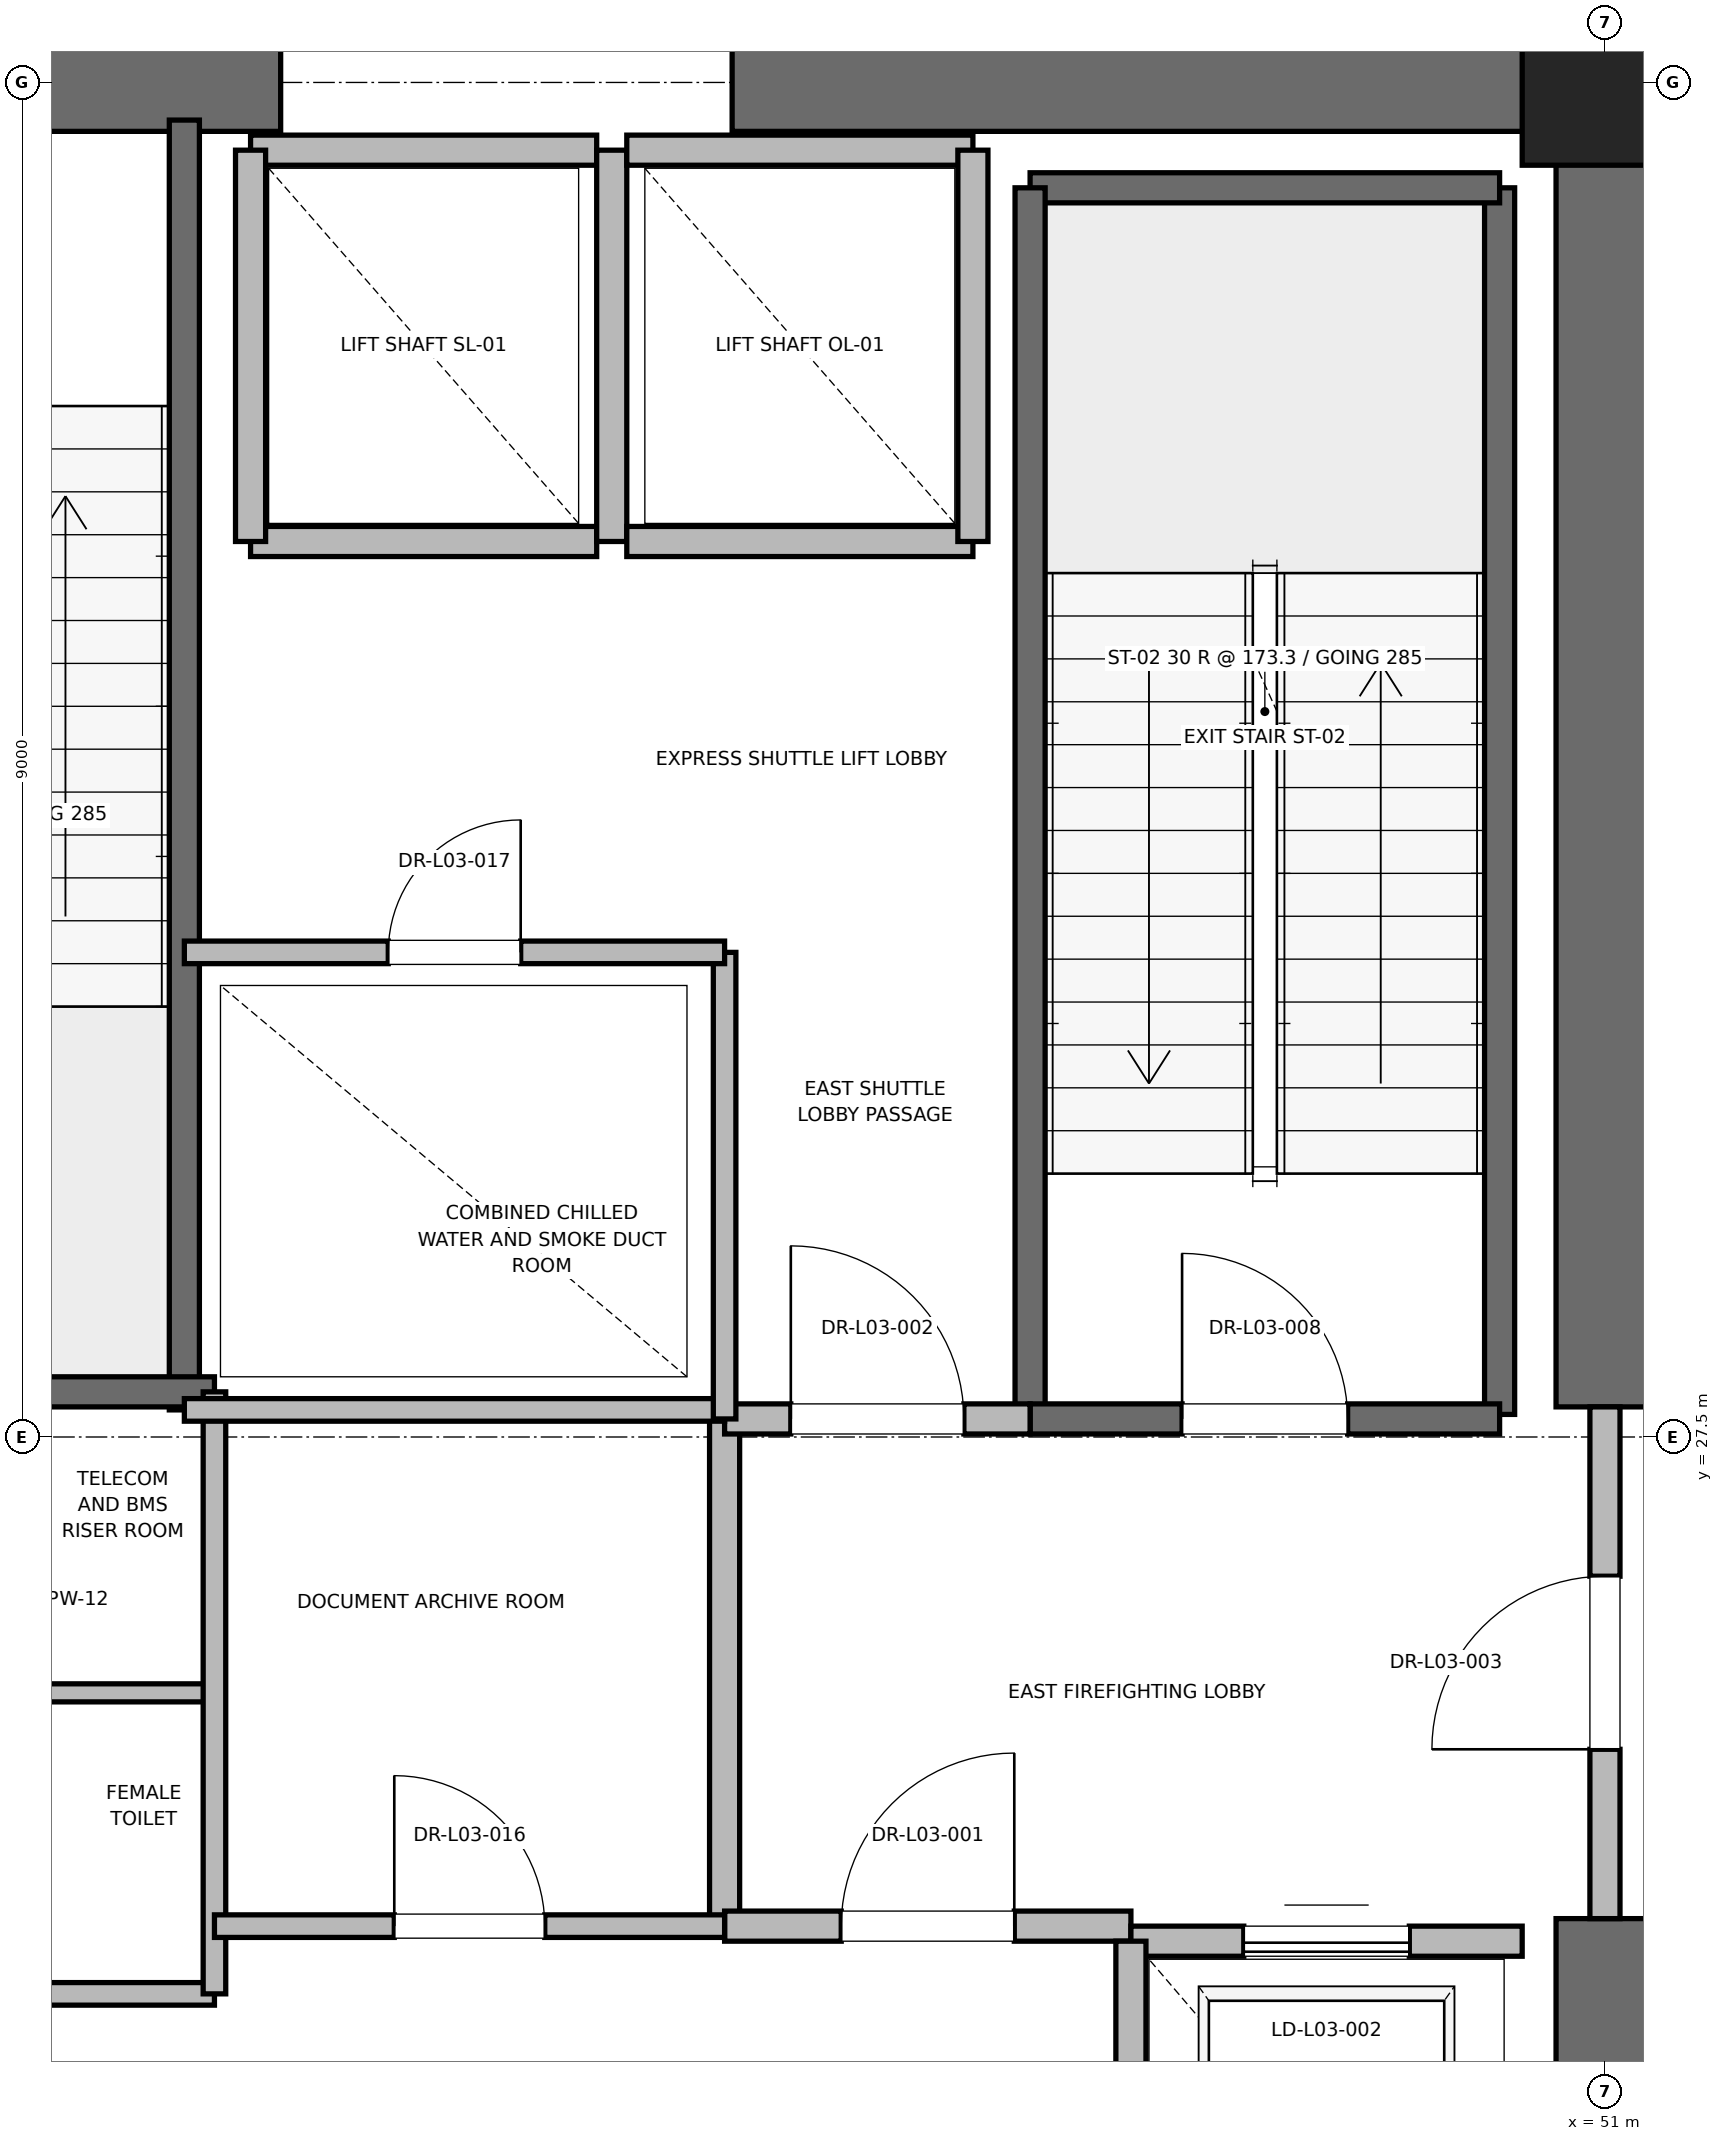
"""IFC4 building model, lengths in metres.
Left out: names, types, materials, properties, quantities, classifications, styles, units other than length and angle.
Written with IfcOpenShell. Run it as: python <this file> out.ifc"""

import sys

from ifc_helpers import new_model, si_unit, direction, frame, frame_2d, origin, origin_2d, place, context, subcontext, project, spatial, rectangle, extrude, element, fill, save


model = new_model("IFC4")
c1 = context("Model", 3, precision=1e-05, world=origin(), true_north=direction((0.0, 1.0)))
c2 = subcontext(c1, "Body", "Model", "MODEL_VIEW")
j1 = project(units=[si_unit("LENGTHUNIT", "METRE"), si_unit("PLANEANGLEUNIT", "RADIAN")], contexts=[c1])
p1 = place(None, origin())
s1 = spatial("IfcSite", under=j1, at=p1, CompositionType="ELEMENT")
p2 = place(p1, origin())
s2 = spatial("IfcBuilding", under=s1, at=p2, CompositionType="ELEMENT")
p3 = place(p2, frame((0.0, 0.0, 16.4)))
s3 = spatial("IfcBuildingStorey", under=s2, at=p3, CompositionType="ELEMENT", Elevation=16.4)
p4 = place(p3, frame((51.0, 36.5, 0.0), z_axis=(0.0, 0.0, 1.0), x_axis=(1.0, 0.0, 0.0)))
e1 = element("IfcColumn", 1, at=p4, inside=s3, PredefinedType="PILASTER", context=c2, shape_type="SweptSolid", body=[
    extrude(rectangle(XDim=1.1, YDim=1.1, at=origin_2d()), origin(), (0.0, 0.0, 1.0), 5.2),
])
p5 = place(p3, frame((37.8, 36.5, 0.0), z_axis=(0.0, 0.0, 1.0), x_axis=(1.0, 0.0, 0.0)))
e2 = element("IfcWall", 2, at=p5, inside=s3, PredefinedType="SHEAR", context=c2, shape_type="SweptSolid", body=[
    extrude(rectangle(XDim=4.4, YDim=0.65, at=frame_2d((2.2, 0.0))), origin(), (0.0, 0.0, 1.0), 4.9),
])
p6 = place(p5, frame((1.65, 0.0, 0.0)))
e3 = element("IfcOpeningElement", 3, at=p6, cuts=e2, PredefinedType="OPENING", context=c2, shape_type="SweptSolid", body=[
    extrude(rectangle(XDim=1.1, YDim=2.15, at=frame_2d((0.55, 1.075))), frame((0.0, 0.325, 0.0), z_axis=(0.0, -1.0, 0.0), x_axis=(1.0, 0.0, 0.0)), (0.0, 0.0, 1.0), 0.65),
])
for number, where, z_axis, x_axis in (
    (4, (45.2, 36.5, 0.0), (0.0, 0.0, 1.0), (1.0, 0.0, 0.0)),
    (5, (51.0, 18.5, 0.0), (0.0, 0.0, 1.0), (0.0, 1.0, 0.0)),
):
    element("IfcWall", number, at=place(p3, frame(where, z_axis=z_axis, x_axis=x_axis)), inside=s3, PredefinedType="SHEAR", context=c2, shape_type="SweptSolid", body=[
        extrude(rectangle(XDim=5.8, YDim=0.65, at=frame_2d((2.9, 0.0))), origin(), (0.0, 0.0, 1.0), 4.9),
    ])
p7 = place(p3, frame((51.0, 27.7, 0.0), z_axis=(0.0, 0.0, 1.0), x_axis=(0.0, 1.0, 0.0)))
e6 = element("IfcWall", 6, at=p7, inside=s3, PredefinedType="SHEAR", context=c2, shape_type="SweptSolid", body=[
    extrude(rectangle(XDim=8.8, YDim=0.65, at=frame_2d((4.4, 0.0))), origin(), (0.0, 0.0, 1.0), 4.9),
])
p8 = place(p3, frame((50.3, 27.65, 0.0), z_axis=(0.0, 0.0, 1.0), x_axis=(0.0, 1.0, 0.0)))
e7 = element("IfcWall", 7, at=p8, inside=s3, PredefinedType="SOLIDWALL", context=c2, shape_type="SweptSolid", body=[
    extrude(rectangle(XDim=8.15, YDim=0.2, at=frame_2d((4.075, 0.0))), origin(), (0.0, 0.0, 1.0), 4.9),
])
p9 = place(p3, frame((47.18, 35.8, 0.0), z_axis=(0.0, 0.0, 1.0), x_axis=(1.0, 0.0, 0.0)))
e8 = element("IfcWall", 8, at=p9, inside=s3, PredefinedType="SOLIDWALL", context=c2, shape_type="SweptSolid", body=[
    extrude(rectangle(XDim=3.12, YDim=0.2, at=frame_2d((1.56, 0.0))), origin(), (0.0, 0.0, 1.0), 4.9),
])
p10 = place(p3, frame((47.18, 27.62, 0.0), z_axis=(0.0, 0.0, 1.0), x_axis=(0.0, 1.0, 0.0)))
e9 = element("IfcWall", 9, at=p10, inside=s3, PredefinedType="SOLIDWALL", context=c2, shape_type="SweptSolid", body=[
    extrude(rectangle(XDim=8.18, YDim=0.2, at=frame_2d((4.09, 0.0))), origin(), (0.0, 0.0, 1.0), 4.9),
])
p11 = place(p3, frame((47.18, 27.62, 0.0), z_axis=(0.0, 0.0, 1.0), x_axis=(1.0, 0.0, 0.0)))
e10 = element("IfcWall", 10, at=p11, inside=s3, PredefinedType="SOLIDWALL", context=c2, shape_type="SweptSolid", body=[
    extrude(rectangle(XDim=3.12, YDim=0.2, at=frame_2d((1.56, 0.0))), origin(), (0.0, 0.0, 1.0), 4.9),
])
p12 = place(p11, frame((1.01, 0.0, 0.0)))
e11 = element("IfcOpeningElement", 11, at=p12, cuts=e10, PredefinedType="OPENING", context=c2, shape_type="SweptSolid", body=[
    extrude(rectangle(XDim=1.1, YDim=2.15, at=frame_2d((0.55, 1.075))), frame((0.0, 0.1, 0.0), z_axis=(0.0, -1.0, 0.0), x_axis=(1.0, 0.0, 0.0)), (0.0, 0.0, 1.0), 0.2),
])
p13 = place(p3, frame((41.56, 27.68, 0.0), z_axis=(0.0, 0.0, 1.0), x_axis=(0.0, 1.0, 0.0)))
e12 = element("IfcWall", 12, at=p13, inside=s3, PredefinedType="SOLIDWALL", context=c2, shape_type="SweptSolid", body=[
    extrude(rectangle(XDim=8.57, YDim=0.2, at=frame_2d((4.285, 0.0))), origin(), (0.0, 0.0, 1.0), 4.9),
])
p14 = place(p3, frame((38.44, 27.8, 0.0), z_axis=(0.0, 0.0, 1.0), x_axis=(1.0, 0.0, 0.0)))
e13 = element("IfcWall", 13, at=p14, inside=s3, PredefinedType="SOLIDWALL", context=c2, shape_type="SweptSolid", body=[
    extrude(rectangle(XDim=3.32, YDim=0.2, at=frame_2d((1.66, 0.0))), origin(), (0.0, 0.0, 1.0), 4.9),
])
p15 = place(p3, frame((45.15, 24.25, 0.0), z_axis=(0.0, 0.0, 1.0), x_axis=(0.0, 1.0, 0.0)))
e14 = element("IfcWall", 14, at=p15, inside=s3, PredefinedType="PARTITIONING", context=c2, shape_type="SweptSolid", body=[
    extrude(rectangle(XDim=3.37, YDim=0.2, at=frame_2d((1.685, 0.0))), origin(), (0.0, 0.0, 1.0), 4.9),
])
p16 = place(p3, frame((45.15, 24.25, 0.0), z_axis=(0.0, 0.0, 1.0), x_axis=(1.0, 0.0, 0.0)))
e15 = element("IfcWall", 15, at=p16, inside=s3, PredefinedType="PARTITIONING", context=c2, shape_type="SweptSolid", body=[
    extrude(rectangle(XDim=2.7, YDim=0.2, at=frame_2d((1.35, 0.0))), origin(), (0.0, 0.0, 1.0), 4.9),
])
p17 = place(p16, frame((0.775, 0.0, 0.0)))
e16 = element("IfcOpeningElement", 16, at=p17, cuts=e15, PredefinedType="OPENING", context=c2, shape_type="SweptSolid", body=[
    extrude(rectangle(XDim=1.15, YDim=2.2, at=frame_2d((0.575, 1.1))), frame((0.0, 0.1, 0.0), z_axis=(0.0, -1.0, 0.0), x_axis=(1.0, 0.0, 0.0)), (0.0, 0.0, 1.0), 0.2),
])
p18 = place(p3, frame((45.15, 27.62, 0.0), z_axis=(0.0, 0.0, 1.0), x_axis=(1.0, 0.0, 0.0)))
e17 = element("IfcWall", 17, at=p18, inside=s3, PredefinedType="PARTITIONING", context=c2, shape_type="SweptSolid", body=[
    extrude(rectangle(XDim=2.03, YDim=0.2, at=frame_2d((1.015, 0.0))), origin(), (0.0, 0.0, 1.0), 4.9),
])
p19 = place(p18, frame((0.44, 0.0, 0.0)))
e18 = element("IfcOpeningElement", 18, at=p19, cuts=e17, PredefinedType="OPENING", context=c2, shape_type="SweptSolid", body=[
    extrude(rectangle(XDim=1.15, YDim=2.2, at=frame_2d((0.575, 1.1))), frame((0.0, 0.1, 0.0), z_axis=(0.0, -1.0, 0.0), x_axis=(1.0, 0.0, 0.0)), (0.0, 0.0, 1.0), 0.2),
])
p20 = place(p3, frame((51.0, 24.3, 0.0), z_axis=(0.0, 0.0, 1.0), x_axis=(0.0, 1.0, 0.0)))
e19 = element("IfcWall", 19, at=p20, inside=s3, PredefinedType="PARTITIONING", context=c2, shape_type="SweptSolid", body=[
    extrude(rectangle(XDim=3.4, YDim=0.2, at=frame_2d((1.7, 0.0))), origin(), (0.0, 0.0, 1.0), 3.68),
])
p21 = place(p20, frame((1.125, 0.0, 0.0)))
e20 = element("IfcOpeningElement", 20, at=p21, cuts=e19, PredefinedType="OPENING", context=c2, shape_type="SweptSolid", body=[
    extrude(rectangle(XDim=1.15, YDim=2.2, at=frame_2d((0.575, 1.1))), frame((0.0, 0.1, 0.0), z_axis=(0.0, -1.0, 0.0), x_axis=(1.0, 0.0, 0.0)), (0.0, 0.0, 1.0), 0.2),
])
p22 = place(p3, frame((50.45, 24.15, 0.0), z_axis=(0.0, 0.0, 1.0), x_axis=(-1.0, 0.0, 0.0)))
e21 = element("IfcWall", 21, at=p22, inside=s3, PredefinedType="SOLIDWALL", context=c2, shape_type="SweptSolid", body=[
    extrude(rectangle(XDim=2.6, YDim=0.2, at=frame_2d((1.3, 0.0))), origin(), (0.0, 0.0, 1.0), 3.68),
])
p23 = place(p22, frame((0.75, 0.0, 0.0)))
e22 = element("IfcOpeningElement", 22, at=p23, cuts=e21, PredefinedType="OPENING", context=c2, shape_type="SweptSolid", body=[
    extrude(rectangle(XDim=1.1, YDim=2.2, at=frame_2d((0.55, 1.1))), frame((0.0, 0.1, 0.0), z_axis=(0.0, -1.0, 0.0), x_axis=(1.0, 0.0, 0.0)), (0.0, 0.0, 1.0), 0.2),
])
p24 = place(p3, frame((47.85, 24.15, 0.0), z_axis=(0.0, 0.0, 1.0), x_axis=(0.0, -1.0, 0.0)))
e23 = element("IfcWall", 23, at=p24, inside=s3, PredefinedType="SOLIDWALL", context=c2, shape_type="SweptSolid", body=[
    extrude(rectangle(XDim=3.0, YDim=0.2, at=frame_2d((1.5, 0.0))), origin(), (0.0, 0.0, 1.0), 4.9),
])
p25 = place(p3, frame((42.0, 33.45, 0.0), z_axis=(0.0, 0.0, 1.0), x_axis=(1.0, 0.0, 0.0)))
e24 = element("IfcWall", 24, at=p25, inside=s3, PredefinedType="SOLIDWALL", context=c2, shape_type="SweptSolid", body=[
    extrude(rectangle(XDim=2.3, YDim=0.2, at=frame_2d((1.15, 0.0))), origin(), (0.0, 0.0, 1.0), 4.9),
])
p26 = place(p3, frame((44.3, 36.05, 0.0), z_axis=(0.0, 0.0, 1.0), x_axis=(-1.0, 0.0, 0.0)))
e25 = element("IfcWall", 25, at=p26, inside=s3, PredefinedType="SOLIDWALL", context=c2, shape_type="SweptSolid", body=[
    extrude(rectangle(XDim=2.3, YDim=0.2, at=frame_2d((1.15, 0.0))), origin(), (0.0, 0.0, 1.0), 3.68),
])
for number, where, z_axis, x_axis in (
    (26, (42.0, 36.05, 0.0), (0.0, 0.0, 1.0), (0.0, -1.0, 0.0)),
    (27, (44.4, 33.45, 0.0), (0.0, 0.0, 1.0), (0.0, 1.0, 0.0)),
):
    element("IfcWall", number, at=place(p3, frame(where, z_axis=z_axis, x_axis=x_axis)), inside=s3, PredefinedType="SOLIDWALL", context=c2, shape_type="SweptSolid", body=[
        extrude(rectangle(XDim=2.6, YDim=0.2, at=frame_2d((1.3, 0.0))), origin(), (0.0, 0.0, 1.0), 3.68),
    ])
p27 = place(p3, frame((44.5, 33.45, 0.0), z_axis=(0.0, 0.0, 1.0), x_axis=(1.0, 0.0, 0.0)))
e28 = element("IfcWall", 28, at=p27, inside=s3, PredefinedType="SOLIDWALL", context=c2, shape_type="SweptSolid", body=[
    extrude(rectangle(XDim=2.3, YDim=0.2, at=frame_2d((1.15, 0.0))), origin(), (0.0, 0.0, 1.0), 4.9),
])
p28 = place(p3, frame((46.8, 36.05, 0.0), z_axis=(0.0, 0.0, 1.0), x_axis=(-1.0, 0.0, 0.0)))
e29 = element("IfcWall", 29, at=p28, inside=s3, PredefinedType="SOLIDWALL", context=c2, shape_type="SweptSolid", body=[
    extrude(rectangle(XDim=2.3, YDim=0.2, at=frame_2d((1.15, 0.0))), origin(), (0.0, 0.0, 1.0), 3.68),
])
p29 = place(p3, frame((46.8, 33.45, 0.0), z_axis=(0.0, 0.0, 1.0), x_axis=(0.0, 1.0, 0.0)))
e30 = element("IfcWall", 30, at=p29, inside=s3, PredefinedType="SOLIDWALL", context=c2, shape_type="SweptSolid", body=[
    extrude(rectangle(XDim=2.6, YDim=0.2, at=frame_2d((1.3, 0.0))), origin(), (0.0, 0.0, 1.0), 4.9),
])
p30 = place(p3, frame((39.95, 23.8, 0.0), z_axis=(0.0, 0.0, 1.0), x_axis=(1.0, 0.0, 0.0)))
e31 = element("IfcWall", 31, at=p30, inside=s3, PredefinedType="PARTITIONING", context=c2, shape_type="SweptSolid", body=[
    extrude(rectangle(XDim=1.81, YDim=0.15, at=frame_2d((0.905, 0.0))), origin(), (0.0, 0.0, 1.0), 2.85),
])
p31 = place(p3, frame((39.95, 25.8, 0.0), z_axis=(0.0, 0.0, 1.0), x_axis=(1.0, 0.0, 0.0)))
e32 = element("IfcWall", 32, at=p31, inside=s3, PredefinedType="PARTITIONING", context=c2, shape_type="SweptSolid", body=[
    extrude(rectangle(XDim=1.81, YDim=0.12, at=frame_2d((0.905, 0.0))), origin(), (0.0, 0.0, 1.0), 2.85),
])
p32 = place(p3, frame((41.76, 23.8, 0.0), z_axis=(0.0, 0.0, 1.0), x_axis=(0.0, 1.0, 0.0)))
e33 = element("IfcWall", 33, at=p32, inside=s3, PredefinedType="PARTITIONING", context=c2, shape_type="SweptSolid", body=[
    extrude(rectangle(XDim=4.0, YDim=0.15, at=frame_2d((2.0, 0.0))), origin(), (0.0, 0.0, 1.0), 2.85),
])
p33 = place(p3, frame((41.56, 27.68, 0.0), z_axis=(0.0, 0.0, 1.0), x_axis=(1.0, 0.0, 0.0)))
e34 = element("IfcWall", 34, at=p33, inside=s3, PredefinedType="PARTITIONING", context=c2, shape_type="SweptSolid", body=[
    extrude(rectangle(XDim=3.59, YDim=0.15, at=frame_2d((1.795, 0.0))), origin(), (0.0, 0.0, 1.0), 2.85),
])
p34 = place(p3, frame((41.76, 24.25, 0.0), z_axis=(0.0, 0.0, 1.0), x_axis=(1.0, 0.0, 0.0)))
e35 = element("IfcWall", 35, at=p34, inside=s3, PredefinedType="PARTITIONING", context=c2, shape_type="SweptSolid", body=[
    extrude(rectangle(XDim=3.39, YDim=0.15, at=frame_2d((1.695, 0.0))), origin(), (0.0, 0.0, 1.0), 2.85),
])
p35 = place(p34, frame((1.195, 0.0, 0.0)))
e36 = element("IfcOpeningElement", 36, at=p35, cuts=e35, PredefinedType="OPENING", context=c2, shape_type="SweptSolid", body=[
    extrude(rectangle(XDim=1.0, YDim=2.15, at=frame_2d((0.5, 1.075))), frame((0.0, 0.075, 0.0), z_axis=(0.0, -1.0, 0.0), x_axis=(1.0, 0.0, 0.0)), (0.0, 0.0, 1.0), 0.15),
])
p36 = place(p3, frame((45.15, 27.62, 0.0), z_axis=(0.0, 0.0, 1.0), x_axis=(0.0, 1.0, 0.0)))
e37 = element("IfcWall", 37, at=p36, inside=s3, PredefinedType="PARTITIONING", context=c2, shape_type="SweptSolid", body=[
    extrude(rectangle(XDim=3.1, YDim=0.15, at=frame_2d((1.55, 0.0))), origin(), (0.0, 0.0, 1.0), 2.85),
])
p37 = place(p3, frame((41.56, 30.72, 0.0), z_axis=(0.0, 0.0, 1.0), x_axis=(1.0, 0.0, 0.0)))
e38 = element("IfcWall", 38, at=p37, inside=s3, PredefinedType="PARTITIONING", context=c2, shape_type="SweptSolid", body=[
    extrude(rectangle(XDim=3.59, YDim=0.15, at=frame_2d((1.795, 0.0))), origin(), (0.0, 0.0, 1.0), 2.85),
])
p38 = place(p37, frame((1.355, 0.0, 0.0)))
e39 = element("IfcOpeningElement", 39, at=p38, cuts=e38, PredefinedType="OPENING", context=c2, shape_type="SweptSolid", body=[
    extrude(rectangle(XDim=0.88, YDim=2.1, at=frame_2d((0.44, 1.05))), frame((0.0, 0.075, 0.0), z_axis=(0.0, -1.0, 0.0), x_axis=(1.0, 0.0, 0.0)), (0.0, 0.0, 1.0), 0.15),
])
p39 = place(p12, origin())
e40 = element("IfcDoor", 40, at=p39, inside=s3, OperationType="SINGLE_SWING_LEFT", PredefinedType="DOOR", context=c2, shape_type="SweptSolid", body=[
    extrude(rectangle(XDim=1.1, YDim=2.15, at=frame_2d((0.55, 1.075))), frame((0.0, 0.025, 0.0), z_axis=(0.0, -1.0, 0.0), x_axis=(1.0, 0.0, 0.0)), (0.0, 0.0, 1.0), 0.05),
])
fill(e11, e40)
p40 = place(p17, origin())
e41 = element("IfcDoor", 41, at=p40, inside=s3, OperationType="SINGLE_SWING_RIGHT", PredefinedType="DOOR", context=c2, shape_type="SweptSolid", body=[
    extrude(rectangle(XDim=1.15, YDim=2.2, at=frame_2d((0.575, 1.1))), frame((0.0, 0.025, 0.0), z_axis=(0.0, -1.0, 0.0), x_axis=(1.0, 0.0, 0.0)), (0.0, 0.0, 1.0), 0.05),
])
fill(e16, e41)
p41 = place(p19, origin())
e42 = element("IfcDoor", 42, at=p41, inside=s3, OperationType="SINGLE_SWING_LEFT", PredefinedType="DOOR", context=c2, shape_type="SweptSolid", body=[
    extrude(rectangle(XDim=1.15, YDim=2.2, at=frame_2d((0.575, 1.1))), frame((0.0, 0.025, 0.0), z_axis=(0.0, -1.0, 0.0), x_axis=(1.0, 0.0, 0.0)), (0.0, 0.0, 1.0), 0.05),
])
fill(e18, e42)
p42 = place(p21, origin())
e43 = element("IfcDoor", 43, at=p42, inside=s3, OperationType="SINGLE_SWING_LEFT", PredefinedType="DOOR", context=c2, shape_type="SweptSolid", body=[
    extrude(rectangle(XDim=1.15, YDim=2.2, at=frame_2d((0.575, 1.1))), frame((0.0, 0.025, 0.0), z_axis=(0.0, -1.0, 0.0), x_axis=(1.0, 0.0, 0.0)), (0.0, 0.0, 1.0), 0.05),
])
fill(e20, e43)
p43 = place(p23, origin())
e44 = element("IfcDoor", 44, at=p43, inside=s3, OperationType="SLIDING_TO_RIGHT", PredefinedType="DOOR", context=c2, shape_type="SweptSolid", body=[
    extrude(rectangle(XDim=1.1, YDim=2.2, at=frame_2d((0.55, 1.1))), frame((0.0, 0.025, 0.0), z_axis=(0.0, -1.0, 0.0), x_axis=(1.0, 0.0, 0.0)), (0.0, 0.0, 1.0), 0.05),
])
fill(e22, e44)
p44 = place(p35, origin())
e45 = element("IfcDoor", 45, at=p44, inside=s3, OperationType="SINGLE_SWING_LEFT", PredefinedType="DOOR", context=c2, shape_type="SweptSolid", body=[
    extrude(rectangle(XDim=1.0, YDim=2.15, at=frame_2d((0.5, 1.075))), frame((0.0, 0.025, 0.0), z_axis=(0.0, -1.0, 0.0), x_axis=(1.0, 0.0, 0.0)), (0.0, 0.0, 1.0), 0.05),
])
fill(e36, e45)
p45 = place(p38, origin())
e46 = element("IfcDoor", 46, at=p45, inside=s3, OperationType="SINGLE_SWING_RIGHT", PredefinedType="DOOR", context=c2, shape_type="SweptSolid", body=[
    extrude(rectangle(XDim=0.88, YDim=2.1, at=frame_2d((0.44, 1.05))), frame((0.0, 0.025, 0.0), z_axis=(0.0, -1.0, 0.0), x_axis=(1.0, 0.0, 0.0)), (0.0, 0.0, 1.0), 0.05),
])
fill(e39, e46)
save(model, sys.argv[1])
